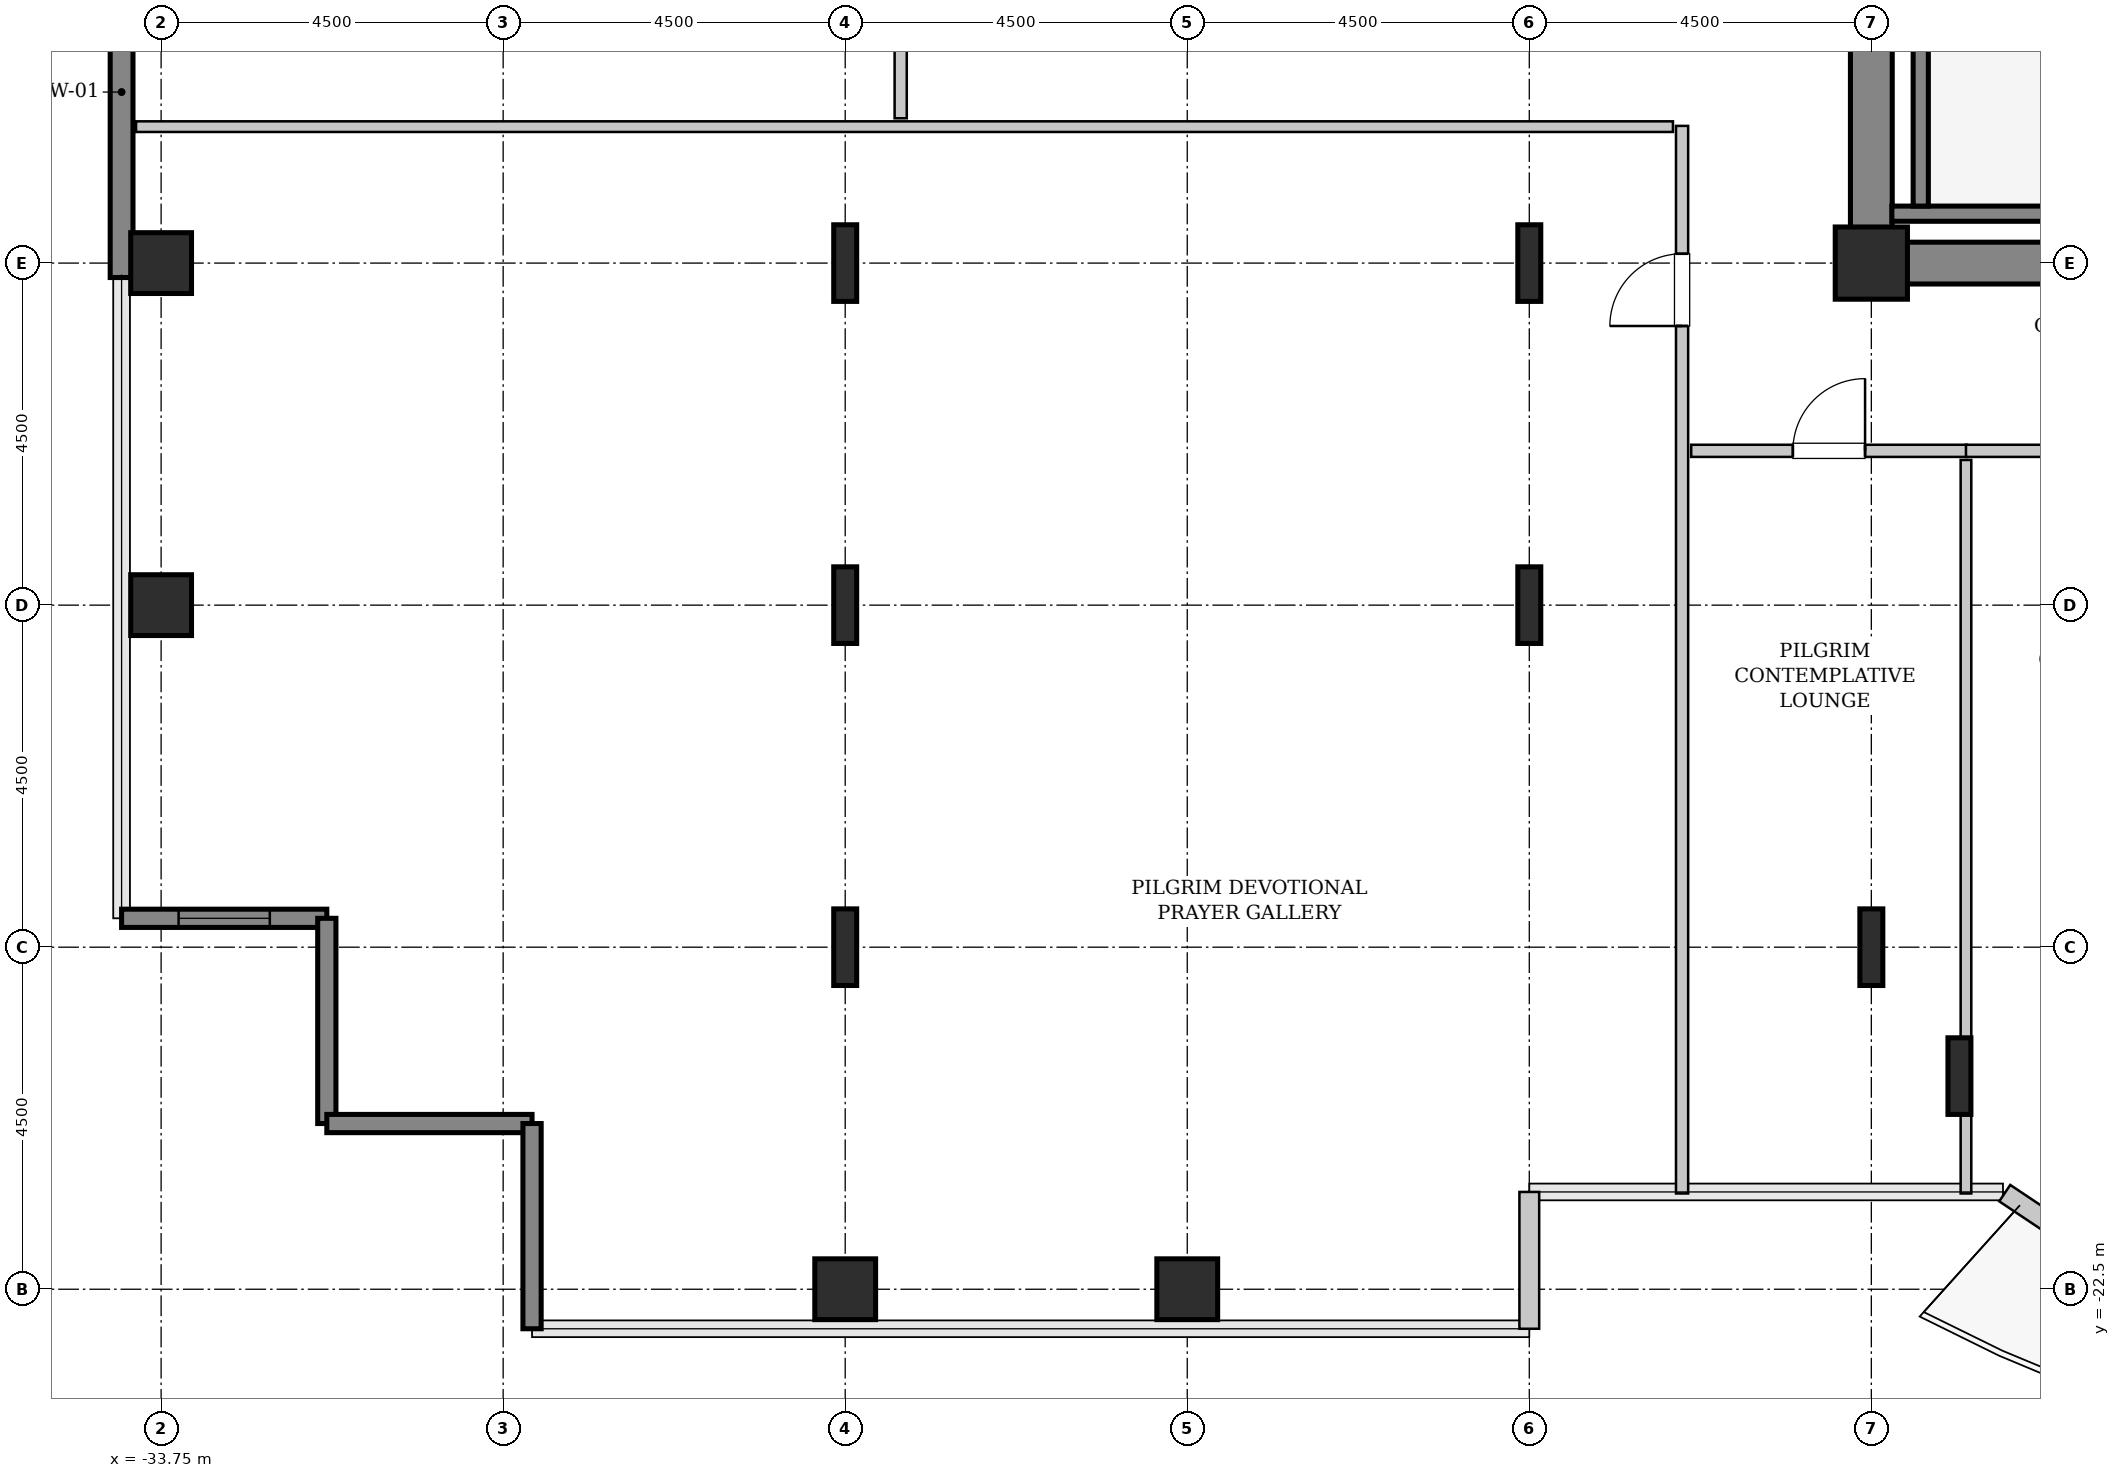
"""IFC4 building model, lengths in metres.
Left out: names, types, materials, properties, quantities, classifications, styles, units other than length and angle.
Written with IfcOpenShell. Run it as: python <this file> out.ifc"""

import sys

from ifc_helpers import new_model, si_unit, direction, frame, frame_2d, origin, origin_2d, place, context, subcontext, project, spatial, rectangle, hollow_rectangle, i_section, extrude, source, transform, mapped, element, fill, save


model = new_model("IFC4")
c1 = context("Model", 3, precision=1e-05, world=origin(), true_north=direction((0.0, 1.0)))
c2 = subcontext(c1, "Body", "Model", "MODEL_VIEW")
j1 = project(units=[si_unit("LENGTHUNIT", "METRE"), si_unit("PLANEANGLEUNIT", "RADIAN")], contexts=[c1])
p1 = place(None, origin())
s1 = spatial("IfcSite", under=j1, at=p1, CompositionType="ELEMENT")
p2 = place(p1, origin())
s2 = spatial("IfcBuilding", under=s1, at=p2, CompositionType="ELEMENT")
p3 = place(p2, frame((0.0, 0.0, 136.4)))
s3 = spatial("IfcBuildingStorey", under=s2, at=p3, CompositionType="ELEMENT", Elevation=136.4)
m1 = source(origin(), c2, "Body", "SweptSolid", [
    extrude(rectangle(XDim=9.975, YDim=0.55, at=frame_2d((4.987, 0.0))), origin(), (0.0, 0.0, 1.0), 3.8),
])
p4 = place(p3, frame((-11.525, -9.0, 0.0), z_axis=(0.0, 0.0, 1.0), x_axis=(1.0, 0.0, 0.0)))
e1 = element("IfcWall", 1, at=p4, inside=s3, PredefinedType="SHEAR", context=c2, shape_type="MappedRepresentation", body=[
    mapped(m1, transform((0.0, 0.0, 0.0), x_axis=(1.0, 0.0, 0.0), y_axis=(0.0, 1.0, 0.0), z_axis=(0.0, 0.0, 1.0), scale=1.0)),
])
m2 = source(origin(), c2, "Body", "SweptSolid", [
    extrude(rectangle(XDim=7.375, YDim=0.55, at=frame_2d((3.688, 0.0))), origin(), (0.0, 0.0, 1.0), 3.8),
])
p5 = place(p3, frame((-11.25, -8.725, 0.0), z_axis=(0.0, 0.0, 1.0), x_axis=(0.0, 1.0, 0.0)))
e2 = element("IfcWall", 2, at=p5, inside=s3, PredefinedType="SHEAR", context=c2, shape_type="MappedRepresentation", body=[
    mapped(m2, transform((0.0, 0.0, 0.0), x_axis=(1.0, 0.0, 0.0), y_axis=(0.0, 1.0, 0.0), z_axis=(0.0, 0.0, 1.0), scale=1.0)),
])
m3 = source(origin(), c2, "Body", "SweptSolid", [
    extrude(hollow_rectangle(XDim=0.8, YDim=0.8, WallThickness=0.04, InnerFilletRadius=0.04, OuterFilletRadius=0.08, at=origin_2d()), origin(), (0.0, 0.0, 1.0), 3.8),
])
for number, where, z_axis, x_axis in (
    (3, (-33.75, -13.5, 0.0), (0.0, 0.0, 1.0), (1.0, 0.0, 0.0)),
    (4, (-33.75, -9.0, 0.0), (0.0, 0.0, 1.0), (1.0, 0.0, 0.0)),
    (5, (-24.75, -22.5, 0.0), (0.0, 0.0, 1.0), (1.0, 0.0, 0.0)),
):
    element("IfcColumn", number, at=place(p3, frame(where, z_axis=z_axis, x_axis=x_axis)), inside=s3, PredefinedType="COLUMN", context=c2, shape_type="MappedRepresentation", body=[
        mapped(m3, transform((0.0, 0.0, 0.0), x_axis=(1.0, 0.0, 0.0), y_axis=(0.0, 1.0, 0.0), z_axis=(0.0, 0.0, 1.0), scale=1.0)),
    ])
m4 = source(origin(), c2, "Body", "SweptSolid", [
    extrude(i_section(OverallWidth=0.302, OverallDepth=1.008, WebThickness=0.021, FlangeThickness=0.04, FilletRadius=0.03, at=origin_2d()), origin(), (0.0, 0.0, 1.0), 3.8),
])
for number, where, z_axis, x_axis in (
    (6, (-24.75, -18.0, 0.0), (0.0, 0.0, 1.0), (1.0, 0.0, 0.0)),
    (7, (-24.75, -13.5, 0.0), (0.0, 0.0, 1.0), (1.0, 0.0, 0.0)),
    (8, (-24.75, -9.0, 0.0), (0.0, 0.0, 1.0), (1.0, 0.0, 0.0)),
):
    element("IfcColumn", number, at=place(p3, frame(where, z_axis=z_axis, x_axis=x_axis)), inside=s3, PredefinedType="COLUMN", context=c2, shape_type="MappedRepresentation", body=[
        mapped(m4, transform((0.0, 0.0, 0.0), x_axis=(1.0, 0.0, 0.0), y_axis=(0.0, 1.0, 0.0), z_axis=(0.0, 0.0, 1.0), scale=1.0)),
    ])
p6 = place(p3, frame((-20.25, -22.5, 0.0), z_axis=(0.0, 0.0, 1.0), x_axis=(1.0, 0.0, 0.0)))
e9 = element("IfcColumn", 9, at=p6, inside=s3, PredefinedType="COLUMN", context=c2, shape_type="MappedRepresentation", body=[
    mapped(m3, transform((0.0, 0.0, 0.0), x_axis=(1.0, 0.0, 0.0), y_axis=(0.0, 1.0, 0.0), z_axis=(0.0, 0.0, 1.0), scale=1.0)),
])
for number, where, z_axis, x_axis in (
    (10, (-15.75, -13.5, 0.0), (0.0, 0.0, 1.0), (1.0, 0.0, 0.0)),
    (11, (-15.75, -9.0, 0.0), (0.0, 0.0, 1.0), (1.0, 0.0, 0.0)),
    (12, (-11.25, -18.0, 0.0), (0.0, 0.0, 1.0), (1.0, 0.0, 0.0)),
):
    element("IfcColumn", number, at=place(p3, frame(where, z_axis=z_axis, x_axis=x_axis)), inside=s3, PredefinedType="COLUMN", context=c2, shape_type="MappedRepresentation", body=[
        mapped(m4, transform((0.0, 0.0, 0.0), x_axis=(1.0, 0.0, 0.0), y_axis=(0.0, 1.0, 0.0), z_axis=(0.0, 0.0, 1.0), scale=1.0)),
    ])
m5 = source(origin(), c2, "Body", "SweptSolid", [
    extrude(hollow_rectangle(XDim=0.95, YDim=0.95, WallThickness=0.045, InnerFilletRadius=0.045, OuterFilletRadius=0.09, at=origin_2d()), origin(), (0.0, 0.0, 1.0), 3.8),
])
p7 = place(p3, frame((-11.25, -9.0, 0.0), z_axis=(0.0, 0.0, 1.0), x_axis=(1.0, 0.0, 0.0)))
e13 = element("IfcColumn", 13, at=p7, inside=s3, PredefinedType="COLUMN", context=c2, shape_type="MappedRepresentation", body=[
    mapped(m5, transform((0.0, 0.0, 0.0), x_axis=(1.0, 0.0, 0.0), y_axis=(0.0, 1.0, 0.0), z_axis=(0.0, 0.0, 1.0), scale=1.0)),
])
p8 = place(p3, frame((-10.091, -19.696, 0.0), z_axis=(0.0, 0.0, 1.0), x_axis=(1.0, 0.0, 0.0)))
e14 = element("IfcColumn", 14, at=p8, inside=s3, PredefinedType="COLUMN", context=c2, shape_type="MappedRepresentation", body=[
    mapped(m4, transform((0.0, 0.0, 0.0), x_axis=(1.0, 0.0, 0.0), y_axis=(0.0, 1.0, 0.0), z_axis=(0.0, 0.0, 1.0), scale=1.0)),
])
m6 = source(origin(), c2, "Body", "SweptSolid", [
    extrude(rectangle(XDim=4.88, YDim=0.3, at=frame_2d((2.44, 0.0))), origin(), (0.0, 0.0, 1.0), 3.55),
])
p9 = place(p3, frame((-34.27, -9.19, 0.0), z_axis=(0.0, 0.0, 1.0), x_axis=(0.0, 1.0, 0.0)))
e15 = element("IfcWall", 15, at=p9, inside=s3, PredefinedType="SHEAR", context=c2, shape_type="MappedRepresentation", body=[
    mapped(m6, transform((0.0, 0.0, 0.0), x_axis=(1.0, 0.0, 0.0), y_axis=(0.0, 1.0, 0.0), z_axis=(0.0, 0.0, 1.0), scale=1.0)),
])
m7 = source(origin(), c2, "Body", "SweptSolid", [
    extrude(rectangle(XDim=2.7, YDim=0.24, at=frame_2d((1.35, 0.0))), origin(), (0.0, 0.0, 1.0), 3.55),
])
p10 = place(p3, frame((-34.27, -17.62, 0.0), z_axis=(0.0, 0.0, 1.0), x_axis=(1.0, 0.0, 0.0)))
e16 = element("IfcWall", 16, at=p10, inside=s3, PredefinedType="SHEAR", context=c2, shape_type="MappedRepresentation", body=[
    mapped(m7, transform((0.0, 0.0, 0.0), x_axis=(1.0, 0.0, 0.0), y_axis=(0.0, 1.0, 0.0), z_axis=(0.0, 0.0, 1.0), scale=1.0)),
])
p11 = place(p10, frame((0.75, 0.0, 0.85)))
e17 = element("IfcOpeningElement", 17, at=p11, cuts=e16, PredefinedType="OPENING", context=c2, shape_type="SweptSolid", body=[
    extrude(rectangle(XDim=1.2, YDim=1.8, at=frame_2d((0.6, 0.9))), frame((0.0, 0.13, 0.0), z_axis=(0.0, -1.0, 0.0), x_axis=(1.0, 0.0, 0.0)), (0.0, 0.0, 1.0), 0.26),
])
for number, where, z_axis, x_axis in (
    (18, (-31.57, -17.62, 0.0), (0.0, 0.0, 1.0), (0.0, -1.0, 0.0)),
    (19, (-31.57, -20.32, 0.0), (0.0, 0.0, 1.0), (1.0, 0.0, 0.0)),
    (20, (-28.87, -20.32, 0.0), (0.0, 0.0, 1.0), (0.0, -1.0, 0.0)),
):
    element("IfcWall", number, at=place(p3, frame(where, z_axis=z_axis, x_axis=x_axis)), inside=s3, PredefinedType="SHEAR", context=c2, shape_type="MappedRepresentation", body=[
        mapped(m7, transform((0.0, 0.0, 0.0), x_axis=(1.0, 0.0, 0.0), y_axis=(0.0, 1.0, 0.0), z_axis=(0.0, 0.0, 1.0), scale=1.0)),
    ])
m8 = source(origin(), c2, "Body", "SweptSolid", [
    extrude(rectangle(XDim=1.8, YDim=0.26, at=frame_2d((0.9, 0.0))), origin(), (0.0, 0.0, 1.0), 3.55),
])
p12 = place(p3, frame((-15.75, -23.02, 0.0), z_axis=(0.0, 0.0, 1.0), x_axis=(0.0, 1.0, 0.0)))
e21 = element("IfcWall", 21, at=p12, inside=s3, PredefinedType="SOLIDWALL", context=c2, shape_type="MappedRepresentation", body=[
    mapped(m8, transform((0.0, 0.0, 0.0), x_axis=(1.0, 0.0, 0.0), y_axis=(0.0, 1.0, 0.0), z_axis=(0.0, 0.0, 1.0), scale=1.0)),
])
m9 = source(origin(), c2, "Body", "SweptSolid", [
    extrude(rectangle(XDim=1.469, YDim=0.26, at=frame_2d((0.734, 0.0))), origin(), (0.0, 0.0, 1.0), 3.55),
])
p13 = place(p3, frame((-9.495, -21.236, 0.0), z_axis=(0.0, 0.0, 1.0), x_axis=(0.831461760506, -0.555581983884, 0.0)))
e22 = element("IfcWall", 22, at=p13, inside=s3, PredefinedType="SOLIDWALL", context=c2, shape_type="MappedRepresentation", body=[
    mapped(m9, transform((0.0, 0.0, 0.0), x_axis=(1.0, 0.0, 0.0), y_axis=(0.0, 1.0, 0.0), z_axis=(0.0, 0.0, 1.0), scale=1.0)),
])
m10 = source(origin(), c2, "Body", "SweptSolid", [
    extrude(rectangle(XDim=3.68, YDim=0.2, at=frame_2d((1.84, 0.0))), origin(), (0.0, 0.0, 1.0), 3.8),
])
p14 = place(p3, frame((-10.98, -8.35, 0.0), z_axis=(0.0, 0.0, 1.0), x_axis=(1.0, 0.0, 0.0)))
e23 = element("IfcWall", 23, at=p14, inside=s3, PredefinedType="SOLIDWALL", context=c2, shape_type="MappedRepresentation", body=[
    mapped(m10, transform((0.0, 0.0, 0.0), x_axis=(1.0, 0.0, 0.0), y_axis=(0.0, 1.0, 0.0), z_axis=(0.0, 0.0, 1.0), scale=1.0)),
])
m11 = source(origin(), c2, "Body", "SweptSolid", [
    extrude(rectangle(XDim=7.1, YDim=0.2, at=frame_2d((3.55, 0.0))), origin(), (0.0, 0.0, 1.0), 3.8),
])
p15 = place(p3, frame((-10.6, -1.15, 0.0), z_axis=(0.0, 0.0, 1.0), x_axis=(0.0, -1.0, 0.0)))
e24 = element("IfcWall", 24, at=p15, inside=s3, PredefinedType="SOLIDWALL", context=c2, shape_type="MappedRepresentation", body=[
    mapped(m11, transform((0.0, 0.0, 0.0), x_axis=(1.0, 0.0, 0.0), y_axis=(0.0, 1.0, 0.0), z_axis=(0.0, 0.0, 1.0), scale=1.0)),
])
m12 = source(origin(), c2, "Body", "SweptSolid", [
    extrude(rectangle(XDim=14.045, YDim=0.16, at=frame_2d((7.022, 0.0))), origin(), (0.0, 0.0, 1.0), 3.535),
])
p16 = place(p3, frame((-13.74, -21.24, 0.0), z_axis=(0.0, 0.0, 1.0), x_axis=(0.0, 1.0, 0.0)))
e25 = element("IfcWall", 25, at=p16, inside=s3, PredefinedType="PARTITIONING", context=c2, shape_type="MappedRepresentation", body=[
    mapped(m12, transform((0.0, 0.0, 0.0), x_axis=(1.0, 0.0, 0.0), y_axis=(0.0, 1.0, 0.0), z_axis=(0.0, 0.0, 1.0), scale=1.0)),
])
p17 = place(p16, frame((11.413, 0.0, 0.0)))
e26 = element("IfcOpeningElement", 26, at=p17, cuts=e25, PredefinedType="OPENING", context=c2, shape_type="SweptSolid", body=[
    extrude(rectangle(XDim=0.95, YDim=2.1, at=frame_2d((0.475, 1.05))), frame((0.0, 0.09, 0.0), z_axis=(0.0, -1.0, 0.0), x_axis=(1.0, 0.0, 0.0)), (0.0, 0.0, 1.0), 0.18),
])
m13 = source(origin(), c2, "Body", "SweptSolid", [
    extrude(rectangle(XDim=20.22, YDim=0.14, at=frame_2d((10.11, 0.0))), origin(), (0.0, 0.0, 1.0), 3.535),
])
p18 = place(p3, frame((-34.08, -7.205, 0.0), z_axis=(0.0, 0.0, 1.0), x_axis=(1.0, 0.0, 0.0)))
e27 = element("IfcWall", 27, at=p18, inside=s3, PredefinedType="PARTITIONING", context=c2, shape_type="MappedRepresentation", body=[
    mapped(m13, transform((0.0, 0.0, 0.0), x_axis=(1.0, 0.0, 0.0), y_axis=(0.0, 1.0, 0.0), z_axis=(0.0, 0.0, 1.0), scale=1.0)),
])
m14 = source(origin(), c2, "Body", "SweptSolid", [
    extrude(rectangle(XDim=14.883, YDim=0.16, at=frame_2d((7.441, 0.0))), origin(), (0.0, 0.0, 1.0), 3.535),
])
p19 = place(p3, frame((-24.02, -7.095, 0.0), z_axis=(0.0, 0.0, 1.0), x_axis=(0.0, 1.0, 0.0)))
e28 = element("IfcWall", 28, at=p19, inside=s3, PredefinedType="PARTITIONING", context=c2, shape_type="MappedRepresentation", body=[
    mapped(m14, transform((0.0, 0.0, 0.0), x_axis=(1.0, 0.0, 0.0), y_axis=(0.0, 1.0, 0.0), z_axis=(0.0, 0.0, 1.0), scale=1.0)),
])
p20 = place(p19, frame((4.37, 0.0, 0.0)))
e29 = element("IfcOpeningElement", 29, at=p20, cuts=e28, PredefinedType="OPENING", context=c2, shape_type="SweptSolid", body=[
    extrude(rectangle(XDim=0.95, YDim=2.1, at=frame_2d((0.475, 1.05))), frame((0.0, 0.09, 0.0), z_axis=(0.0, -1.0, 0.0), x_axis=(1.0, 0.0, 0.0)), (0.0, 0.0, 1.0), 0.18),
])
m15 = source(origin(), c2, "Body", "SweptSolid", [
    extrude(rectangle(XDim=3.625, YDim=0.16, at=frame_2d((1.812, 0.0))), origin(), (0.0, 0.0, 1.0), 3.535),
])
p21 = place(p3, frame((-13.62, -11.47, 0.0), z_axis=(0.0, 0.0, 1.0), x_axis=(1.0, 0.0, 0.0)))
e30 = element("IfcWall", 30, at=p21, inside=s3, PredefinedType="PARTITIONING", context=c2, shape_type="MappedRepresentation", body=[
    mapped(m15, transform((0.0, 0.0, 0.0), x_axis=(1.0, 0.0, 0.0), y_axis=(0.0, 1.0, 0.0), z_axis=(0.0, 0.0, 1.0), scale=1.0)),
])
p22 = place(p21, frame((1.337, 0.0, 0.0)))
e31 = element("IfcOpeningElement", 31, at=p22, cuts=e30, PredefinedType="OPENING", context=c2, shape_type="SweptSolid", body=[
    extrude(rectangle(XDim=0.95, YDim=2.1, at=frame_2d((0.475, 1.05))), frame((0.0, 0.09, 0.0), z_axis=(0.0, -1.0, 0.0), x_axis=(1.0, 0.0, 0.0)), (0.0, 0.0, 1.0), 0.18),
])
m16 = source(origin(), c2, "Body", "SweptSolid", [
    extrude(rectangle(XDim=9.65, YDim=0.14, at=frame_2d((4.825, 0.0))), origin(), (0.0, 0.0, 1.0), 3.535),
])
p23 = place(p3, frame((-10.005, -21.24, 0.0), z_axis=(0.0, 0.0, 1.0), x_axis=(0.0, 1.0, 0.0)))
e32 = element("IfcWall", 32, at=p23, inside=s3, PredefinedType="PARTITIONING", context=c2, shape_type="MappedRepresentation", body=[
    mapped(m16, transform((0.0, 0.0, 0.0), x_axis=(1.0, 0.0, 0.0), y_axis=(0.0, 1.0, 0.0), z_axis=(0.0, 0.0, 1.0), scale=1.0)),
])
m17 = source(origin(), c2, "Body", "SweptSolid", [
    extrude(rectangle(XDim=4.202, YDim=0.16, at=frame_2d((2.101, 0.0))), origin(), (0.0, 0.0, 1.0), 3.535),
])
p24 = place(p3, frame((-10.005, -11.47, 0.0), z_axis=(0.0, 0.0, 1.0), x_axis=(1.0, 0.0, 0.0)))
e33 = element("IfcWall", 33, at=p24, inside=s3, PredefinedType="PARTITIONING", context=c2, shape_type="MappedRepresentation", body=[
    mapped(m17, transform((0.0, 0.0, 0.0), x_axis=(1.0, 0.0, 0.0), y_axis=(0.0, 1.0, 0.0), z_axis=(0.0, 0.0, 1.0), scale=1.0)),
])
p25 = place(p24, frame((1.626, 0.0, 0.0)))
e34 = element("IfcOpeningElement", 34, at=p25, cuts=e33, PredefinedType="OPENING", context=c2, shape_type="SweptSolid", body=[
    extrude(rectangle(XDim=0.95, YDim=2.1, at=frame_2d((0.475, 1.05))), frame((0.0, 0.09, 0.0), z_axis=(0.0, -1.0, 0.0), x_axis=(1.0, 0.0, 0.0)), (0.0, 0.0, 1.0), 0.18),
])
m18 = source(origin(), c2, "Body", "SweptSolid", [
    extrude(rectangle(XDim=1.2, YDim=1.8, at=frame_2d((0.6, 0.9))), frame((0.0, 0.03, 0.0), z_axis=(0.0, -1.0, 0.0), x_axis=(1.0, 0.0, 0.0)), (0.0, 0.0, 1.0), 0.06),
])
p26 = place(p11, origin())
e35 = element("IfcWindow", 35, at=p26, inside=s3, PartitioningType="SINGLE_PANEL", PredefinedType="WINDOW", context=c2, shape_type="MappedRepresentation", body=[
    mapped(m18, transform((0.0, 0.0, 0.0), x_axis=(1.0, 0.0, 0.0), y_axis=(0.0, 1.0, 0.0), z_axis=(0.0, 0.0, 1.0), scale=1.0)),
])
fill(e17, e35)
m19 = source(origin(), c2, "Body", "SweptSolid", [
    extrude(rectangle(XDim=0.95, YDim=2.1, at=frame_2d((0.475, 1.05))), frame((0.0, 0.025, 0.0), z_axis=(0.0, -1.0, 0.0), x_axis=(1.0, 0.0, 0.0)), (0.0, 0.0, 1.0), 0.05),
])
p27 = place(p17, origin())
e36 = element("IfcDoor", 36, at=p27, inside=s3, OperationType="SINGLE_SWING_LEFT", PredefinedType="DOOR", context=c2, shape_type="MappedRepresentation", body=[
    mapped(m19, transform((0.0, 0.0, 0.0), x_axis=(1.0, 0.0, 0.0), y_axis=(0.0, 1.0, 0.0), z_axis=(0.0, 0.0, 1.0), scale=1.0)),
])
fill(e26, e36)
p28 = place(p22, origin())
e37 = element("IfcDoor", 37, at=p28, inside=s3, OperationType="SINGLE_SWING_RIGHT", PredefinedType="DOOR", context=c2, shape_type="MappedRepresentation", body=[
    mapped(m19, transform((0.0, 0.0, 0.0), x_axis=(1.0, 0.0, 0.0), y_axis=(0.0, 1.0, 0.0), z_axis=(0.0, 0.0, 1.0), scale=1.0)),
])
fill(e31, e37)
save(model, sys.argv[1])
